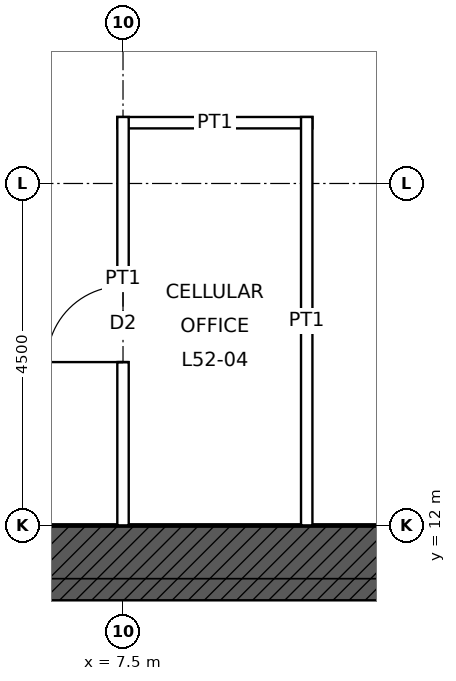
"""IFC4 building model, lengths in metres.
Left out: names, types, materials, properties, quantities, classifications, styles, units other than length and angle.
Written with IfcOpenShell. Run it as: python <this file> out.ifc"""

import sys

from ifc_helpers import new_model, si_unit, direction, frame, frame_2d, origin, place, context, subcontext, project, spatial, rectangle, extrude, element, fill, save


model = new_model("IFC4")
c1 = context("Model", 3, precision=1e-05, world=origin(), true_north=direction((0.0, 1.0)))
c2 = subcontext(c1, "Body", "Model", "MODEL_VIEW")
j1 = project(units=[si_unit("LENGTHUNIT", "METRE"), si_unit("PLANEANGLEUNIT", "RADIAN")], contexts=[c1])
p1 = place(None, origin())
s1 = spatial("IfcSite", under=j1, at=p1, CompositionType="ELEMENT")
p2 = place(p1, origin())
s2 = spatial("IfcBuilding", under=s1, at=p2, CompositionType="ELEMENT")
p3 = place(p2, frame((0.0, 0.0, 241.9)))
s3 = spatial("IfcBuildingStorey", under=s2, at=p3, CompositionType="ELEMENT", Elevation=241.9)
p4 = place(p3, frame((-12.0, 11.5, 0.0), z_axis=(0.0, 0.0, 1.0), x_axis=(1.0, 0.0, 0.0)))
e1 = element("IfcWall", 1, at=p4, inside=s3, PredefinedType="SHEAR", context=c2, shape_type="SweptSolid", body=[
    extrude(rectangle(XDim=24.0, YDim=1.0, at=frame_2d((12.0, 0.0))), origin(), (0.0, 0.0, 1.0), 4.0),
])
p5 = place(p4, frame((6.25, 0.0, 0.0)))
e2 = element("IfcOpeningElement", 2, at=p5, cuts=e1, PredefinedType="OPENING", context=c2, shape_type="SweptSolid", body=[
    extrude(rectangle(XDim=1.0, YDim=2.4, at=frame_2d((0.5, 1.2))), frame((0.0, 0.51, 0.0), z_axis=(0.0, -1.0, 0.0), x_axis=(1.0, 0.0, 0.0)), (0.0, 0.0, 1.0), 1.02),
])
p6 = place(p4, frame((16.75, 0.0, 0.0)))
e3 = element("IfcOpeningElement", 3, at=p6, cuts=e1, PredefinedType="OPENING", context=c2, shape_type="SweptSolid", body=[
    extrude(rectangle(XDim=1.0, YDim=2.4, at=frame_2d((0.5, 1.2))), frame((0.0, 0.51, 0.0), z_axis=(0.0, -1.0, 0.0), x_axis=(1.0, 0.0, 0.0)), (0.0, 0.0, 1.0), 1.02),
])
p7 = place(p3, frame((7.425, 17.3, 0.0), z_axis=(0.0, 0.0, 1.0), x_axis=(1.0, 0.0, 0.0)))
e4 = element("IfcWall", 4, at=p7, inside=s3, PredefinedType="PARTITIONING", context=c2, shape_type="SweptSolid", body=[
    extrude(rectangle(XDim=2.567, YDim=0.15, at=frame_2d((1.283, 0.0))), origin(), (0.0, 0.0, 1.0), 3.85),
])
p8 = place(p3, frame((7.5, 12.0, 0.0), z_axis=(0.0, 0.0, 1.0), x_axis=(0.0, 1.0, 0.0)))
e5 = element("IfcWall", 5, at=p8, inside=s3, PredefinedType="PARTITIONING", context=c2, shape_type="SweptSolid", body=[
    extrude(rectangle(XDim=5.375, YDim=0.15, at=frame_2d((2.688, 0.0))), origin(), (0.0, 0.0, 1.0), 3.238),
])
p9 = place(p8, frame((2.15, 0.0, 0.0)))
e6 = element("IfcOpeningElement", 6, at=p9, cuts=e5, PredefinedType="OPENING", context=c2, shape_type="SweptSolid", body=[
    extrude(rectangle(XDim=1.0, YDim=2.1, at=frame_2d((0.5, 1.05))), frame((0.0, 0.085, 0.0), z_axis=(0.0, -1.0, 0.0), x_axis=(1.0, 0.0, 0.0)), (0.0, 0.0, 1.0), 0.17),
])
p10 = place(p3, frame((9.917, 12.0, 0.0), z_axis=(0.0, 0.0, 1.0), x_axis=(0.0, 1.0, 0.0)))
e7 = element("IfcWall", 7, at=p10, inside=s3, PredefinedType="PARTITIONING", context=c2, shape_type="SweptSolid", body=[
    extrude(rectangle(XDim=5.375, YDim=0.15, at=frame_2d((2.688, 0.0))), origin(), (0.0, 0.0, 1.0), 3.85),
])
p11 = place(p9, origin())
e8 = element("IfcDoor", 8, at=p11, inside=s3, OperationType="SINGLE_SWING_LEFT", PredefinedType="DOOR", context=c2, shape_type="SweptSolid", body=[
    extrude(rectangle(XDim=1.0, YDim=2.1, at=frame_2d((0.5, 1.05))), frame((0.0, 0.025, 0.0), z_axis=(0.0, -1.0, 0.0), x_axis=(1.0, 0.0, 0.0)), (0.0, 0.0, 1.0), 0.05),
])
fill(e6, e8)
save(model, sys.argv[1])
